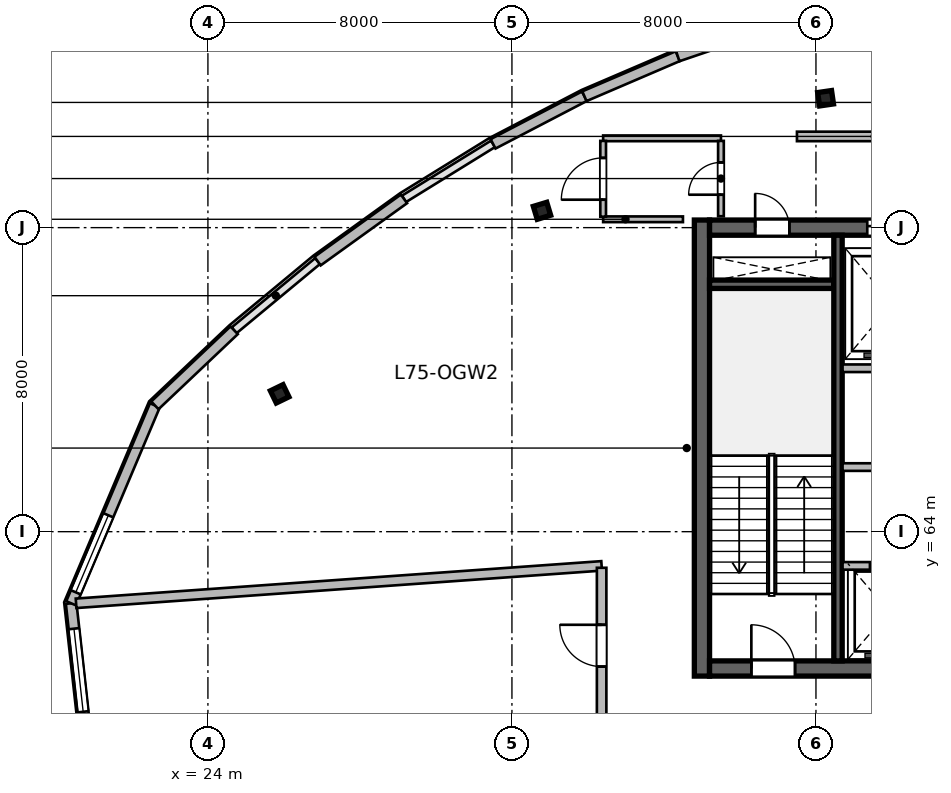
"""IFC4 building model, lengths in metres.
Left out: names, types, materials, properties, quantities, classifications, styles, units other than length and angle.
Written with IfcOpenShell. Run it as: python <this file> out.ifc"""

import sys

from ifc_helpers import new_model, si_unit, direction, frame, frame_2d, origin, origin_2d, place, context, subcontext, project, spatial, rectangle, i_section, extrude, source, transform, mapped, element, fill, save


model = new_model("IFC4")
c1 = context("Model", 3, precision=1e-05, world=origin(), true_north=direction((0.0, 1.0)))
c2 = subcontext(c1, "Body", "Model", "MODEL_VIEW")
j1 = project(units=[si_unit("LENGTHUNIT", "METRE"), si_unit("PLANEANGLEUNIT", "RADIAN")], contexts=[c1])
p1 = place(None, origin())
s1 = spatial("IfcSite", under=j1, at=p1, CompositionType="ELEMENT")
p2 = place(p1, origin())
s2 = spatial("IfcBuilding", under=s1, at=p2, CompositionType="ELEMENT")
p3 = place(p2, frame((0.0, 0.0, 307.8)))
s3 = spatial("IfcBuildingStorey", under=s2, at=p3, CompositionType="ELEMENT", Elevation=307.8)
m1 = source(origin(), c2, "Body", "SweptSolid", [
    extrude(rectangle(XDim=12.0, YDim=0.4, at=frame_2d((6.0, 0.0))), origin(), (0.0, 0.0, 1.0), 4.8),
])
p4 = place(p3, frame((37.0, 60.2, 0.0), z_axis=(0.0, 0.0, 1.0), x_axis=(0.0, 1.0, 0.0)))
e1 = element("IfcWall", 1, at=p4, inside=s3, PredefinedType="SHEAR", context=c2, shape_type="MappedRepresentation", body=[
    mapped(m1, transform((0.0, 0.0, 0.0), scale=1.0)),
])
m2 = source(origin(), c2, "Body", "SweptSolid", [
    extrude(rectangle(XDim=21.6, YDim=0.4, at=frame_2d((10.8, 0.0))), origin(), (0.0, 0.0, 1.0), 4.8),
])
p5 = place(p3, frame((37.2, 60.4, 0.0), z_axis=(0.0, 0.0, 1.0), x_axis=(1.0, 0.0, 0.0)))
e2 = element("IfcWall", 2, at=p5, inside=s3, PredefinedType="SHEAR", context=c2, shape_type="MappedRepresentation", body=[
    mapped(m2, transform((0.0, 0.0, 0.0), scale=1.0)),
])
p6 = place(p5, frame((1.1, 0.0, 0.0)))
e3 = element("IfcOpeningElement", 3, at=p6, cuts=e2, PredefinedType="OPENING", context=c2, shape_type="SweptSolid", body=[
    extrude(rectangle(XDim=1.15, YDim=2.15, at=frame_2d((0.575, 1.075))), frame((0.0, 0.21, 0.0), z_axis=(0.0, -1.0, 0.0), x_axis=(1.0, 0.0, 0.0)), (0.0, 0.0, 1.0), 0.42),
])
p7 = place(p5, frame((19.5, 0.0, 0.0)))
e4 = element("IfcOpeningElement", 4, at=p7, cuts=e2, PredefinedType="OPENING", context=c2, shape_type="SweptSolid", body=[
    extrude(rectangle(XDim=0.9, YDim=2.1, at=frame_2d((0.45, 1.05))), frame((0.0, 0.21, 0.0), z_axis=(0.0, -1.0, 0.0), x_axis=(1.0, 0.0, 0.0)), (0.0, 0.0, 1.0), 0.42),
])
p8 = place(p5, frame((12.02, 0.0, 0.0)))
e5 = element("IfcOpeningElement", 5, at=p8, cuts=e2, PredefinedType="OPENING", context=c2, shape_type="SweptSolid", body=[
    extrude(rectangle(XDim=1.6, YDim=2.15, at=frame_2d((0.8, 1.075))), frame((0.0, 0.21, 0.0), z_axis=(0.0, -1.0, 0.0), x_axis=(1.0, 0.0, 0.0)), (0.0, 0.0, 1.0), 0.42),
])
p9 = place(p3, frame((37.2, 72.0, 0.0), z_axis=(0.0, 0.0, 1.0), x_axis=(1.0, 0.0, 0.0)))
e6 = element("IfcWall", 6, at=p9, inside=s3, PredefinedType="SHEAR", context=c2, shape_type="MappedRepresentation", body=[
    mapped(m2, transform((0.0, 0.0, 0.0), scale=1.0)),
])
p10 = place(p9, frame((1.2, 0.0, 0.0)))
e7 = element("IfcOpeningElement", 7, at=p10, cuts=e6, PredefinedType="OPENING", context=c2, shape_type="SweptSolid", body=[
    extrude(rectangle(XDim=0.9, YDim=2.1, at=frame_2d((0.45, 1.05))), frame((0.0, 0.21, 0.0), z_axis=(0.0, -1.0, 0.0), x_axis=(1.0, 0.0, 0.0)), (0.0, 0.0, 1.0), 0.42),
])
p11 = place(p9, frame((14.7, 0.0, 0.0)))
e8 = element("IfcOpeningElement", 8, at=p11, cuts=e6, PredefinedType="OPENING", context=c2, shape_type="SweptSolid", body=[
    extrude(rectangle(XDim=1.2, YDim=2.15, at=frame_2d((0.6, 1.075))), frame((0.0, 0.21, 0.0), z_axis=(0.0, -1.0, 0.0), x_axis=(1.0, 0.0, 0.0)), (0.0, 0.0, 1.0), 0.42),
])
p12 = place(p9, frame((4.15, 0.0, 0.0)))
e9 = element("IfcOpeningElement", 9, at=p12, cuts=e6, PredefinedType="OPENING", context=c2, shape_type="SweptSolid", body=[
    extrude(rectangle(XDim=1.3, YDim=2.15, at=frame_2d((0.65, 1.075))), frame((0.0, 0.21, 0.0), z_axis=(0.0, -1.0, 0.0), x_axis=(1.0, 0.0, 0.0)), (0.0, 0.0, 1.0), 0.42),
])
p13 = place(p9, frame((6.76, 0.0, 0.0)))
e10 = element("IfcOpeningElement", 10, at=p13, cuts=e6, PredefinedType="OPENING", context=c2, shape_type="SweptSolid", body=[
    extrude(rectangle(XDim=0.85, YDim=2.1, at=frame_2d((0.425, 1.05))), frame((0.0, 0.21, 0.0), z_axis=(0.0, -1.0, 0.0), x_axis=(1.0, 0.0, 0.0)), (0.0, 0.0, 1.0), 0.42),
])
p14 = place(p9, frame((8.76, 0.0, 0.0)))
e11 = element("IfcOpeningElement", 11, at=p14, cuts=e6, PredefinedType="OPENING", context=c2, shape_type="SweptSolid", body=[
    extrude(rectangle(XDim=0.85, YDim=2.1, at=frame_2d((0.425, 1.05))), frame((0.0, 0.21, 0.0), z_axis=(0.0, -1.0, 0.0), x_axis=(1.0, 0.0, 0.0)), (0.0, 0.0, 1.0), 0.42),
])
p15 = place(p9, frame((10.725, 0.0, 0.0)))
e12 = element("IfcOpeningElement", 12, at=p15, cuts=e6, PredefinedType="OPENING", context=c2, shape_type="SweptSolid", body=[
    extrude(rectangle(XDim=0.85, YDim=2.1, at=frame_2d((0.425, 1.05))), frame((0.0, 0.21, 0.0), z_axis=(0.0, -1.0, 0.0), x_axis=(1.0, 0.0, 0.0)), (0.0, 0.0, 1.0), 0.42),
])
m3 = source(origin(), c2, "Body", "SweptSolid", [
    extrude(rectangle(XDim=3.27, YDim=0.22, at=frame_2d((1.635, 0.0))), origin(), (0.0, 0.0, 1.0), 4.8),
])
p16 = place(p3, frame((37.2, 70.51, 0.0), z_axis=(0.0, 0.0, 1.0), x_axis=(1.0, 0.0, 0.0)))
e13 = element("IfcWall", 13, at=p16, inside=s3, PredefinedType="SHEAR", context=c2, shape_type="MappedRepresentation", body=[
    mapped(m3, transform((0.0, 0.0, 0.0), scale=1.0)),
])
m4 = source(origin(), c2, "Body", "SweptSolid", [
    extrude(rectangle(XDim=11.2, YDim=0.22, at=frame_2d((5.6, 0.0))), origin(), (0.0, 0.0, 1.0), 4.8),
])
p17 = place(p3, frame((40.58, 60.6, 0.0), z_axis=(0.0, 0.0, 1.0), x_axis=(0.0, 1.0, 0.0)))
e14 = element("IfcWall", 14, at=p17, inside=s3, PredefinedType="SHEAR", context=c2, shape_type="MappedRepresentation", body=[
    mapped(m4, transform((0.0, 0.0, 0.0), scale=1.0)),
])
m5 = source(origin(), c2, "Body", "SweptSolid", [
    extrude(i_section(OverallWidth=0.369, OverallDepth=0.356, WebThickness=0.011, FlangeThickness=0.018, at=origin_2d()), origin(), (0.0, 0.0, 1.0), 4.8),
])
for number, where, z_axis, x_axis in (
    (15, (25.888, 67.627, 0.0), (0.0, 0.0, 1.0), (-0.436, 0.9, 0.0)),
    (16, (32.791, 72.442, 0.0), (0.0, 0.0, 1.0), (-0.289, 0.957, 0.0)),
    (17, (40.253, 75.404, 0.0), (0.0, 0.0, 1.0), (-0.143, 0.99, 0.0)),
):
    element("IfcColumn", number, at=place(p3, frame(where, z_axis=z_axis, x_axis=x_axis)), inside=s3, PredefinedType="COLUMN", context=c2, shape_type="MappedRepresentation", body=[
        mapped(m5, transform((0.0, 0.0, 0.0), scale=1.0)),
    ])
m6 = source(origin(), c2, "Body", "SweptSolid", [
    extrude(rectangle(XDim=7.09, YDim=0.28, at=frame_2d((3.545, 0.0))), origin(), (0.0, 0.0, 1.0), 4.5),
])
p18 = place(p3, frame((21.182, 55.069, 0.0), z_axis=(0.0, 0.0, 1.0), x_axis=(-0.110159396922, 0.993913933532, 0.0)))
e18 = element("IfcWall", 18, at=p18, inside=s3, PredefinedType="SOLIDWALL", context=c2, shape_type="MappedRepresentation", body=[
    mapped(m6, transform((0.0, 0.0, 0.0), scale=1.0)),
])
p19 = place(p18, frame((4.217, 0.0, 0.95)))
e19 = element("IfcOpeningElement", 19, at=p19, cuts=e18, PredefinedType="OPENING", context=c2, shape_type="SweptSolid", body=[
    extrude(rectangle(XDim=2.2, YDim=2.1, at=frame_2d((1.1, 1.05))), frame((0.0, 0.15, 0.0), z_axis=(0.0, -1.0, 0.0), x_axis=(1.0, 0.0, 0.0)), (0.0, 0.0, 1.0), 0.3),
])
m7 = source(origin(), c2, "Body", "SweptSolid", [
    extrude(rectangle(XDim=5.655, YDim=0.28, at=frame_2d((2.828, 0.0))), origin(), (0.0, 0.0, 1.0), 4.5),
])
p20 = place(p3, frame((20.401, 62.116, 0.0), z_axis=(0.0, 0.0, 1.0), x_axis=(0.389585063528, 0.920990487614, 0.0)))
e20 = element("IfcWall", 20, at=p20, inside=s3, PredefinedType="SOLIDWALL", context=c2, shape_type="MappedRepresentation", body=[
    mapped(m7, transform((0.0, 0.0, 0.0), scale=1.0)),
])
p21 = place(p20, frame((0.314, 0.0, 0.95)))
e21 = element("IfcOpeningElement", 21, at=p21, cuts=e20, PredefinedType="OPENING", context=c2, shape_type="SweptSolid", body=[
    extrude(rectangle(XDim=2.2, YDim=2.1, at=frame_2d((1.1, 1.05))), frame((0.0, 0.15, 0.0), z_axis=(0.0, -1.0, 0.0), x_axis=(1.0, 0.0, 0.0)), (0.0, 0.0, 1.0), 0.3),
])
m8 = source(origin(), c2, "Body", "SweptSolid", [
    extrude(rectangle(XDim=2.873, YDim=0.28, at=frame_2d((1.436, 0.0))), origin(), (0.0, 0.0, 1.0), 4.5),
])
p22 = place(p3, frame((22.604, 67.324, 0.0), z_axis=(0.0, 0.0, 1.0), x_axis=(0.72609560544, 0.687593754888, 0.0)))
e22 = element("IfcWall", 22, at=p22, inside=s3, PredefinedType="SOLIDWALL", context=c2, shape_type="MappedRepresentation", body=[
    mapped(m8, transform((0.0, 0.0, 0.0), scale=1.0)),
])
m9 = source(origin(), c2, "Body", "SweptSolid", [
    extrude(rectangle(XDim=2.802, YDim=0.28, at=frame_2d((1.401, 0.0))), origin(), (0.0, 0.0, 1.0), 4.5),
])
p23 = place(p3, frame((26.885, 71.12, 0.0), z_axis=(0.0, 0.0, 1.0), x_axis=(0.811507896482, 0.584341453217, 0.0)))
e23 = element("IfcWall", 23, at=p23, inside=s3, PredefinedType="SOLIDWALL", context=c2, shape_type="MappedRepresentation", body=[
    mapped(m9, transform((0.0, 0.0, 0.0), scale=1.0)),
])
m10 = source(origin(), c2, "Body", "SweptSolid", [
    extrude(rectangle(XDim=2.711, YDim=0.28, at=frame_2d((1.356, 0.0))), origin(), (0.0, 0.0, 1.0), 4.5),
])
p24 = place(p3, frame((31.502, 74.205, 0.0), z_axis=(0.0, 0.0, 1.0), x_axis=(0.886828760751, 0.462098202881, 0.0)))
e24 = element("IfcWall", 24, at=p24, inside=s3, PredefinedType="SOLIDWALL", context=c2, shape_type="MappedRepresentation", body=[
    mapped(m10, transform((0.0, 0.0, 0.0), scale=1.0)),
])
m11 = source(origin(), c2, "Body", "SweptSolid", [
    extrude(rectangle(XDim=2.673, YDim=0.28, at=frame_2d((1.337, 0.0))), origin(), (0.0, 0.0, 1.0), 4.5),
])
p25 = place(p3, frame((33.907, 75.458, 0.0), z_axis=(0.0, 0.0, 1.0), x_axis=(0.919036345912, 0.394172798266, 0.0)))
e25 = element("IfcWall", 25, at=p25, inside=s3, PredefinedType="SOLIDWALL", context=c2, shape_type="MappedRepresentation", body=[
    mapped(m11, transform((0.0, 0.0, 0.0), scale=1.0)),
])
m12 = source(origin(), c2, "Body", "SweptSolid", [
    extrude(rectangle(XDim=2.64, YDim=0.28, at=frame_2d((1.32, 0.0))), origin(), (0.0, 0.0, 1.0), 4.5),
])
p26 = place(p3, frame((36.364, 76.511, 0.0), z_axis=(0.0, 0.0, 1.0), x_axis=(0.946685911962, 0.322158011064, 0.0)))
e26 = element("IfcWall", 26, at=p26, inside=s3, PredefinedType="SOLIDWALL", context=c2, shape_type="MappedRepresentation", body=[
    mapped(m12, transform((0.0, 0.0, 0.0), scale=1.0)),
])
m13 = source(origin(), c2, "Body", "SweptSolid", [
    extrude(rectangle(XDim=8.8, YDim=0.2, at=frame_2d((4.4, 0.0))), origin(), (0.0, 0.0, 1.0), 4.5),
])
p27 = place(p3, frame((40.7, 68.3, 0.0), z_axis=(0.0, 0.0, 1.0), x_axis=(1.0, 0.0, 0.0)))
e27 = element("IfcWall", 27, at=p27, inside=s3, PredefinedType="SOLIDWALL", context=c2, shape_type="MappedRepresentation", body=[
    mapped(m13, transform((0.0, 0.0, 0.0), scale=1.0)),
])
m14 = source(origin(), c2, "Body", "SweptSolid", [
    extrude(rectangle(XDim=8.02, YDim=0.2, at=frame_2d((4.01, 0.0))), origin(), (0.0, 0.0, 1.0), 4.5),
])
p28 = place(p3, frame((40.7, 63.1, 0.0), z_axis=(0.0, 0.0, 1.0), x_axis=(1.0, 0.0, 0.0)))
e28 = element("IfcWall", 28, at=p28, inside=s3, PredefinedType="SOLIDWALL", context=c2, shape_type="MappedRepresentation", body=[
    mapped(m14, transform((0.0, 0.0, 0.0), scale=1.0)),
])
p29 = place(p28, frame((0.72, 0.0, 0.0)))
e29 = element("IfcOpeningElement", 29, at=p29, cuts=e28, PredefinedType="OPENING", context=c2, shape_type="SweptSolid", body=[
    extrude(rectangle(XDim=1.0, YDim=2.15, at=frame_2d((0.5, 1.075))), frame((0.0, 0.11, 0.0), z_axis=(0.0, -1.0, 0.0), x_axis=(1.0, 0.0, 0.0)), (0.0, 0.0, 1.0), 0.22),
])
p30 = place(p28, frame((2.62, 0.0, 0.0)))
e30 = element("IfcOpeningElement", 30, at=p30, cuts=e28, PredefinedType="OPENING", context=c2, shape_type="SweptSolid", body=[
    extrude(rectangle(XDim=1.0, YDim=2.15, at=frame_2d((0.5, 1.075))), frame((0.0, 0.11, 0.0), z_axis=(0.0, -1.0, 0.0), x_axis=(1.0, 0.0, 0.0)), (0.0, 0.0, 1.0), 0.22),
])
p31 = place(p28, frame((4.55, 0.0, 0.0)))
e31 = element("IfcOpeningElement", 31, at=p31, cuts=e28, PredefinedType="OPENING", context=c2, shape_type="SweptSolid", body=[
    extrude(rectangle(XDim=1.0, YDim=2.15, at=frame_2d((0.5, 1.075))), frame((0.0, 0.11, 0.0), z_axis=(0.0, -1.0, 0.0), x_axis=(1.0, 0.0, 0.0)), (0.0, 0.0, 1.0), 0.22),
])
p32 = place(p28, frame((6.55, 0.0, 0.0)))
e32 = element("IfcOpeningElement", 32, at=p32, cuts=e28, PredefinedType="OPENING", context=c2, shape_type="SweptSolid", body=[
    extrude(rectangle(XDim=1.0, YDim=2.15, at=frame_2d((0.5, 1.075))), frame((0.0, 0.11, 0.0), z_axis=(0.0, -1.0, 0.0), x_axis=(1.0, 0.0, 0.0)), (0.0, 0.0, 1.0), 0.22),
])
p33 = place(p3, frame((40.7, 65.7, 0.0), z_axis=(0.0, 0.0, 1.0), x_axis=(1.0, 0.0, 0.0)))
e33 = element("IfcWall", 33, at=p33, inside=s3, PredefinedType="SOLIDWALL", context=c2, shape_type="MappedRepresentation", body=[
    mapped(m13, transform((0.0, 0.0, 0.0), scale=1.0)),
])
p34 = place(p33, frame((3.8, 0.0, 0.0)))
e34 = element("IfcOpeningElement", 34, at=p34, cuts=e33, PredefinedType="OPENING", context=c2, shape_type="SweptSolid", body=[
    extrude(rectangle(XDim=0.95, YDim=2.15, at=frame_2d((0.475, 1.075))), frame((0.0, 0.11, 0.0), z_axis=(0.0, -1.0, 0.0), x_axis=(1.0, 0.0, 0.0)), (0.0, 0.0, 1.0), 0.22),
])
m15 = source(origin(), c2, "Body", "SweptSolid", [
    extrude(rectangle(XDim=2.1, YDim=0.15, at=frame_2d((1.05, 0.0))), origin(), (0.0, 0.0, 1.0), 4.5),
])
p35 = place(p3, frame((34.4, 72.22, 0.0), z_axis=(0.0, 0.0, 1.0), x_axis=(1.0, 0.0, 0.0)))
e35 = element("IfcWall", 35, at=p35, inside=s3, PredefinedType="PARTITIONING", context=c2, shape_type="MappedRepresentation", body=[
    mapped(m15, transform((0.0, 0.0, 0.0), scale=1.0)),
])
m16 = source(origin(), c2, "Body", "SweptSolid", [
    extrude(rectangle(XDim=3.1, YDim=0.15, at=frame_2d((1.55, 0.0))), origin(), (0.0, 0.0, 1.0), 3.931),
])
p36 = place(p3, frame((34.4, 74.35, 0.0), z_axis=(0.0, 0.0, 1.0), x_axis=(1.0, 0.0, 0.0)))
e36 = element("IfcWall", 36, at=p36, inside=s3, PredefinedType="PARTITIONING", context=c2, shape_type="MappedRepresentation", body=[
    mapped(m16, transform((0.0, 0.0, 0.0), scale=1.0)),
])
m17 = source(origin(), c2, "Body", "SweptSolid", [
    extrude(rectangle(XDim=1.995, YDim=0.15, at=frame_2d((0.998, 0.0))), origin(), (0.0, 0.0, 1.0), 4.5),
])
p37 = place(p3, frame((34.4, 72.288, 0.0), z_axis=(0.0, 0.0, 1.0), x_axis=(0.0, 1.0, 0.0)))
e37 = element("IfcWall", 37, at=p37, inside=s3, PredefinedType="PARTITIONING", context=c2, shape_type="MappedRepresentation", body=[
    mapped(m17, transform((0.0, 0.0, 0.0), scale=1.0)),
])
p38 = place(p37, frame((0.448, 0.0, 0.0)))
e38 = element("IfcOpeningElement", 38, at=p38, cuts=e37, PredefinedType="OPENING", context=c2, shape_type="SweptSolid", body=[
    extrude(rectangle(XDim=1.1, YDim=2.15, at=frame_2d((0.55, 1.075))), frame((0.0, 0.085, 0.0), z_axis=(0.0, -1.0, 0.0), x_axis=(1.0, 0.0, 0.0)), (0.0, 0.0, 1.0), 0.17),
])
m18 = source(origin(), c2, "Body", "SweptSolid", [
    extrude(rectangle(XDim=1.982, YDim=0.15, at=frame_2d((0.991, 0.0))), origin(), (0.0, 0.0, 1.0), 4.5),
])
p39 = place(p3, frame((37.5, 72.3, 0.0), z_axis=(0.0, 0.0, 1.0), x_axis=(0.0, 1.0, 0.0)))
e39 = element("IfcWall", 39, at=p39, inside=s3, PredefinedType="PARTITIONING", context=c2, shape_type="MappedRepresentation", body=[
    mapped(m18, transform((0.0, 0.0, 0.0), scale=1.0)),
])
p40 = place(p39, frame((0.566, 0.0, 0.0)))
e40 = element("IfcOpeningElement", 40, at=p40, cuts=e39, PredefinedType="OPENING", context=c2, shape_type="SweptSolid", body=[
    extrude(rectangle(XDim=0.85, YDim=2.1, at=frame_2d((0.425, 1.05))), frame((0.0, 0.085, 0.0), z_axis=(0.0, -1.0, 0.0), x_axis=(1.0, 0.0, 0.0)), (0.0, 0.0, 1.0), 0.17),
])
m19 = source(origin(), c2, "Body", "SweptSolid", [
    extrude(rectangle(XDim=7.3, YDim=0.25, at=frame_2d((3.65, 0.0))), origin(), (0.0, 0.0, 1.0), 4.5),
])
p41 = place(p3, frame((39.5, 74.4, 0.0), z_axis=(0.0, 0.0, 1.0), x_axis=(1.0, 0.0, 0.0)))
e41 = element("IfcWall", 41, at=p41, inside=s3, PredefinedType="PARTITIONING", context=c2, shape_type="MappedRepresentation", body=[
    mapped(m19, transform((0.0, 0.0, 0.0), scale=1.0)),
])
p42 = place(p41, frame((3.1, 0.0, 0.0)))
e42 = element("IfcOpeningElement", 42, at=p42, cuts=e41, PredefinedType="OPENING", context=c2, shape_type="SweptSolid", body=[
    extrude(rectangle(XDim=1.1, YDim=2.15, at=frame_2d((0.55, 1.075))), frame((0.0, 0.135, 0.0), z_axis=(0.0, -1.0, 0.0), x_axis=(1.0, 0.0, 0.0)), (0.0, 0.0, 1.0), 0.27),
])
m20 = source(origin(), c2, "Body", "SweptSolid", [
    extrude(rectangle(XDim=13.864, YDim=0.25, at=frame_2d((6.932, 0.0))), origin(), (0.0, 0.0, 1.0), 4.5),
])
p43 = place(p3, frame((20.531, 62.115, 0.0), z_axis=(0.0, 0.0, 1.0), x_axis=(0.997472447014, 0.071054327443, 0.0)))
e43 = element("IfcWall", 43, at=p43, inside=s3, PredefinedType="PARTITIONING", context=c2, shape_type="MappedRepresentation", body=[
    mapped(m20, transform((0.0, 0.0, 0.0), scale=1.0)),
])
m21 = source(origin(), c2, "Body", "SweptSolid", [
    extrude(rectangle(XDim=15.081, YDim=0.25, at=frame_2d((7.541, 0.0))), origin(), (0.0, 0.0, 1.0), 4.5),
])
p44 = place(p3, frame((34.36, 47.969, 0.0), z_axis=(0.0, 0.0, 1.0), x_axis=(0.0, 1.0, 0.0)))
e44 = element("IfcWall", 44, at=p44, inside=s3, PredefinedType="PARTITIONING", context=c2, shape_type="MappedRepresentation", body=[
    mapped(m21, transform((0.0, 0.0, 0.0), scale=1.0)),
])
p45 = place(p44, frame((12.481, 0.0, 0.0)))
e45 = element("IfcOpeningElement", 45, at=p45, cuts=e44, PredefinedType="OPENING", context=c2, shape_type="SweptSolid", body=[
    extrude(rectangle(XDim=1.1, YDim=2.15, at=frame_2d((0.55, 1.075))), frame((0.0, 0.135, 0.0), z_axis=(0.0, -1.0, 0.0), x_axis=(1.0, 0.0, 0.0)), (0.0, 0.0, 1.0), 0.27),
])
m22 = source(origin(), c2, "Body", "SweptSolid", [
    extrude(rectangle(XDim=2.2, YDim=2.1, at=frame_2d((1.1, 1.05))), frame((0.0, 0.03, 0.0), z_axis=(0.0, -1.0, 0.0), x_axis=(1.0, 0.0, 0.0)), (0.0, 0.0, 1.0), 0.06),
])
p46 = place(p19, origin())
e46 = element("IfcWindow", 46, at=p46, inside=s3, PartitioningType="TRIPLE_PANEL_VERTICAL", PredefinedType="WINDOW", context=c2, shape_type="MappedRepresentation", body=[
    mapped(m22, transform((0.0, 0.0, 0.0), scale=1.0)),
])
fill(e19, e46)
p47 = place(p21, origin())
e47 = element("IfcWindow", 47, at=p47, inside=s3, PartitioningType="TRIPLE_PANEL_VERTICAL", PredefinedType="WINDOW", context=c2, shape_type="MappedRepresentation", body=[
    mapped(m22, transform((0.0, 0.0, 0.0), scale=1.0)),
])
fill(e21, e47)
m23 = source(origin(), c2, "Body", "SweptSolid", [
    extrude(rectangle(XDim=1.15, YDim=2.15, at=frame_2d((0.575, 1.075))), frame((0.0, 0.025, 0.0), z_axis=(0.0, -1.0, 0.0), x_axis=(1.0, 0.0, 0.0)), (0.0, 0.0, 1.0), 0.05),
])
p48 = place(p6, origin())
e48 = element("IfcDoor", 48, at=p48, inside=s3, OperationType="SINGLE_SWING_LEFT", PredefinedType="DOOR", context=c2, shape_type="MappedRepresentation", body=[
    mapped(m23, transform((0.0, 0.0, 0.0), scale=1.0)),
])
fill(e3, e48)
m24 = source(origin(), c2, "Body", "SweptSolid", [
    extrude(rectangle(XDim=0.9, YDim=2.1, at=frame_2d((0.45, 1.05))), frame((0.0, 0.025, 0.0), z_axis=(0.0, -1.0, 0.0), x_axis=(1.0, 0.0, 0.0)), (0.0, 0.0, 1.0), 0.05),
])
p49 = place(p10, origin())
e49 = element("IfcDoor", 49, at=p49, inside=s3, OperationType="SINGLE_SWING_LEFT", PredefinedType="DOOR", context=c2, shape_type="MappedRepresentation", body=[
    mapped(m24, transform((0.0, 0.0, 0.0), scale=1.0)),
])
fill(e7, e49)
m25 = source(origin(), c2, "Body", "SweptSolid", [
    extrude(rectangle(XDim=1.3, YDim=2.15, at=frame_2d((0.65, 1.075))), frame((0.0, 0.025, 0.0), z_axis=(0.0, -1.0, 0.0), x_axis=(1.0, 0.0, 0.0)), (0.0, 0.0, 1.0), 0.05),
])
p50 = place(p12, origin())
e50 = element("IfcDoor", 50, at=p50, inside=s3, OperationType="DOUBLE_DOOR_SLIDING", PredefinedType="DOOR", context=c2, shape_type="MappedRepresentation", body=[
    mapped(m25, transform((0.0, 0.0, 0.0), scale=1.0)),
])
fill(e9, e50)
m26 = source(origin(), c2, "Body", "SweptSolid", [
    extrude(rectangle(XDim=1.0, YDim=2.15, at=frame_2d((0.5, 1.075))), frame((0.0, 0.025, 0.0), z_axis=(0.0, -1.0, 0.0), x_axis=(1.0, 0.0, 0.0)), (0.0, 0.0, 1.0), 0.05),
])
p51 = place(p29, origin())
e51 = element("IfcDoor", 51, at=p51, inside=s3, OperationType="DOUBLE_DOOR_SLIDING", PredefinedType="DOOR", context=c2, shape_type="MappedRepresentation", body=[
    mapped(m26, transform((0.0, 0.0, 0.0), scale=1.0)),
])
fill(e29, e51)
m27 = source(origin(), c2, "Body", "SweptSolid", [
    extrude(rectangle(XDim=0.85, YDim=2.1, at=frame_2d((0.425, 1.05))), frame((0.0, 0.025, 0.0), z_axis=(0.0, -1.0, 0.0), x_axis=(1.0, 0.0, 0.0)), (0.0, 0.0, 1.0), 0.05),
])
p52 = place(p40, origin())
e52 = element("IfcDoor", 52, at=p52, inside=s3, OperationType="SINGLE_SWING_LEFT", PredefinedType="DOOR", context=c2, shape_type="MappedRepresentation", body=[
    mapped(m27, transform((0.0, 0.0, 0.0), scale=1.0)),
])
fill(e40, e52)
m28 = source(origin(), c2, "Body", "SweptSolid", [
    extrude(rectangle(XDim=1.1, YDim=2.15, at=frame_2d((0.55, 1.075))), frame((0.0, 0.025, 0.0), z_axis=(0.0, -1.0, 0.0), x_axis=(1.0, 0.0, 0.0)), (0.0, 0.0, 1.0), 0.05),
])
p53 = place(p45, origin())
e53 = element("IfcDoor", 53, at=p53, inside=s3, OperationType="SINGLE_SWING_RIGHT", PredefinedType="DOOR", context=c2, shape_type="MappedRepresentation", body=[
    mapped(m28, transform((0.0, 0.0, 0.0), scale=1.0)),
])
fill(e45, e53)
p54 = place(p38, origin())
e54 = element("IfcDoor", 54, at=p54, inside=s3, OperationType="SINGLE_SWING_LEFT", PredefinedType="DOOR", context=c2, shape_type="MappedRepresentation", body=[
    mapped(m28, transform((0.0, 0.0, 0.0), scale=1.0)),
])
fill(e38, e54)
save(model, sys.argv[1])
